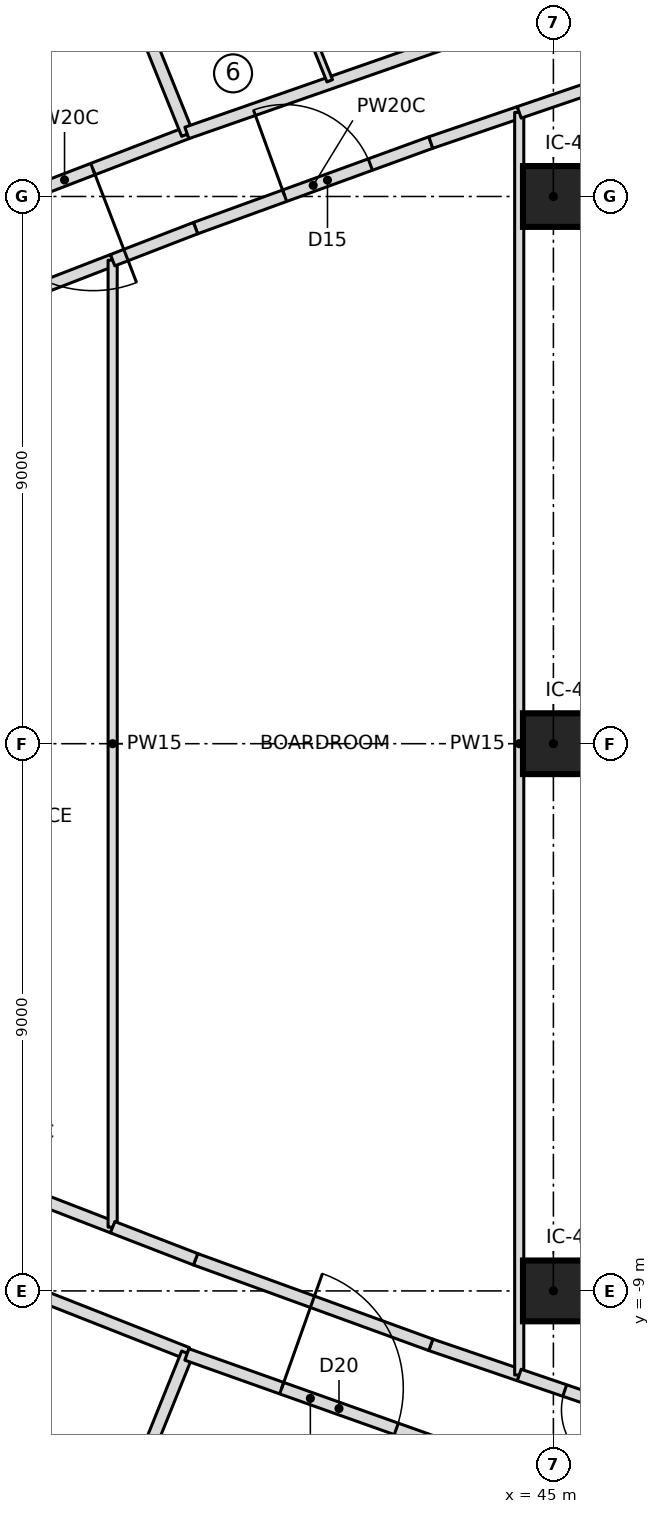
"""IFC4 building model, lengths in metres.
Left out: names, types, materials, properties, quantities, classifications, styles, units other than length and angle.
Written with IfcOpenShell. Run it as: python <this file> out.ifc"""

import sys

from ifc_helpers import new_model, si_unit, direction, frame, frame_2d, origin, origin_2d, place, context, subcontext, project, spatial, rectangle, extrude, element, fill, save


model = new_model("IFC4")
c1 = context("Model", 3, precision=1e-05, world=origin(), true_north=direction((0.0, 1.0)))
c2 = subcontext(c1, "Body", "Model", "MODEL_VIEW")
j1 = project(units=[si_unit("LENGTHUNIT", "METRE"), si_unit("PLANEANGLEUNIT", "RADIAN")], contexts=[c1])
p1 = place(None, origin())
s1 = spatial("IfcSite", under=j1, at=p1, CompositionType="ELEMENT")
p2 = place(p1, origin())
s2 = spatial("IfcBuilding", under=s1, at=p2, CompositionType="ELEMENT")
p3 = place(p2, frame((0.0, 0.0, 200.35)))
s3 = spatial("IfcBuildingStorey", under=s2, at=p3, CompositionType="ELEMENT", Elevation=200.35)
for number, where, z_axis, x_axis in (
    (1, (45.0, -9.0, 0.0), (0.0, 0.0, 1.0), (1.0, 0.0, 0.0)),
    (2, (45.0, 0.0, 0.0), (0.0, 0.0, 1.0), (1.0, 0.0, 0.0)),
    (3, (45.0, 9.0, 0.0), (0.0, 0.0, 1.0), (1.0, 0.0, 0.0)),
):
    element("IfcColumn", number, at=place(p3, frame(where, z_axis=z_axis, x_axis=x_axis)), inside=s3, PredefinedType="COLUMN", context=c2, shape_type="SweptSolid", body=[
        extrude(rectangle(XDim=1.0, YDim=1.0, at=origin_2d()), origin(), (0.0, 0.0, 1.0), 3.55),
    ])
p4 = place(p3, frame((38.972, 10.045, 0.0), z_axis=(0.0, 0.0, 1.0), x_axis=(-0.93335728106, -0.358948723208, 0.0)))
e4 = element("IfcWall", 4, at=p4, inside=s3, PredefinedType="PARTITIONING", context=c2, shape_type="SweptSolid", body=[
    extrude(rectangle(XDim=4.312, YDim=0.2, at=frame_2d((2.156, 0.0))), origin(), (0.0, 0.0, 1.0), 3.25),
])
p5 = place(p4, frame((1.656, 0.0, 0.0)))
e5 = element("IfcOpeningElement", 5, at=p5, cuts=e4, PredefinedType="OPENING", context=c2, shape_type="SweptSolid", body=[
    extrude(rectangle(XDim=2.0, YDim=2.4, at=frame_2d((1.0, 1.2))), frame((0.0, 0.11, 0.0), z_axis=(0.0, -1.0, 0.0), x_axis=(1.0, 0.0, 0.0)), (0.0, 0.0, 1.0), 0.22),
])
p6 = place(p3, frame((38.98, 10.026, 0.0), z_axis=(0.0, 0.0, 1.0), x_axis=(-0.373863662938, 0.927483671843, 0.0)))
e6 = element("IfcWall", 6, at=p6, inside=s3, PredefinedType="PARTITIONING", context=c2, shape_type="SweptSolid", body=[
    extrude(rectangle(XDim=7.604, YDim=0.2, at=frame_2d((3.802, 0.0))), origin(), (0.0, 0.0, 1.0), 3.25),
])
p7 = place(p3, frame((47.113, 12.886, 0.0), z_axis=(0.0, 0.0, 1.0), x_axis=(-0.944155939639, -0.329498955453, 0.0)))
e7 = element("IfcWall", 7, at=p7, inside=s3, PredefinedType="PARTITIONING", context=c2, shape_type="SweptSolid", body=[
    extrude(rectangle(XDim=8.622, YDim=0.2, at=frame_2d((4.311, 0.0))), origin(), (0.0, 0.0, 1.0), 3.25),
])
p8 = place(p7, frame((0.35, 0.0, 0.0)))
e8 = element("IfcOpeningElement", 8, at=p8, cuts=e7, PredefinedType="OPENING", context=c2, shape_type="SweptSolid", body=[
    extrude(rectangle(XDim=1.5, YDim=2.1, at=frame_2d((0.75, 1.05))), frame((0.0, 0.11, 0.0), z_axis=(0.0, -1.0, 0.0), x_axis=(1.0, 0.0, 0.0)), (0.0, 0.0, 1.0), 0.22),
])
p9 = place(p3, frame((40.47, 13.016, 0.0), z_axis=(0.0, 0.0, 1.0), x_axis=(0.373846436826, -0.927490615409, 0.0)))
e9 = element("IfcWall", 9, at=p9, inside=s3, PredefinedType="PARTITIONING", context=c2, shape_type="SweptSolid", body=[
    extrude(rectangle(XDim=2.279, YDim=0.1, at=frame_2d((1.139, 0.0))), origin(), (0.0, 0.0, 1.0), 3.25),
])
p10 = place(p3, frame((30.958, -6.866, 0.0), z_axis=(0.0, 0.0, 1.0), x_axis=(0.93040517394, -0.366532689274, 0.0)))
e10 = element("IfcWall", 10, at=p10, inside=s3, PredefinedType="PARTITIONING", context=c2, shape_type="SweptSolid", body=[
    extrude(rectangle(XDim=8.622, YDim=0.2, at=frame_2d((4.311, 0.0))), origin(), (0.0, 0.0, 1.0), 3.25),
])
p11 = place(p10, frame((4.25, 0.0, 0.0)))
e11 = element("IfcOpeningElement", 11, at=p11, cuts=e10, PredefinedType="OPENING", context=c2, shape_type="SweptSolid", body=[
    extrude(rectangle(XDim=1.5, YDim=2.1, at=frame_2d((0.75, 1.05))), frame((0.0, 0.11, 0.0), z_axis=(0.0, -1.0, 0.0), x_axis=(1.0, 0.0, 0.0)), (0.0, 0.0, 1.0), 0.22),
])
p12 = place(p3, frame((36.137, -17.079, 0.0), z_axis=(0.0, 0.0, 1.0), x_axis=(0.373863662938, 0.927483671843, 0.0)))
e12 = element("IfcWall", 12, at=p12, inside=s3, PredefinedType="PARTITIONING", context=c2, shape_type="SweptSolid", body=[
    extrude(rectangle(XDim=7.604, YDim=0.2, at=frame_2d((3.802, 0.0))), origin(), (0.0, 0.0, 1.0), 3.25),
])
p13 = place(p3, frame((38.972, -10.045, 0.0), z_axis=(0.0, 0.0, 1.0), x_axis=(0.942220252757, -0.334994022773, 0.0)))
e13 = element("IfcWall", 13, at=p13, inside=s3, PredefinedType="PARTITIONING", context=c2, shape_type="SweptSolid", body=[
    extrude(rectangle(XDim=4.31, YDim=0.2, at=frame_2d((2.155, 0.0))), origin(), (0.0, 0.0, 1.0), 3.25),
])
p14 = place(p13, frame((1.655, 0.0, 0.0)))
e14 = element("IfcOpeningElement", 14, at=p14, cuts=e13, PredefinedType="OPENING", context=c2, shape_type="SweptSolid", body=[
    extrude(rectangle(XDim=2.0, YDim=2.4, at=frame_2d((1.0, 1.2))), frame((0.0, 0.11, 0.0), z_axis=(0.0, -1.0, 0.0), x_axis=(1.0, 0.0, 0.0)), (0.0, 0.0, 1.0), 0.22),
])
for number, where, z_axis, x_axis in (
    (15, (35.276, 6.994, 0.0), (0.0, 0.0, 1.0), (0.933, 0.361, 0.0)),
    (16, (37.752, -7.952, 0.0), (0.0, 0.0, 1.0), (-0.933, 0.361, 0.0)),
):
    element("IfcWall", number, at=place(p3, frame(where, z_axis=z_axis, x_axis=x_axis)), inside=s3, PredefinedType="PARTITIONING", context=c2, shape_type="SweptSolid", body=[
        extrude(rectangle(XDim=2.655, YDim=0.2, at=frame_2d((1.327, 0.0))), origin(), (0.0, 0.0, 1.0), 3.25),
    ])
p15 = place(p3, frame((37.752, -7.952, 0.0), z_axis=(0.0, 0.0, 1.0), x_axis=(0.0, 1.0, 0.0)))
e17 = element("IfcWall", 17, at=p15, inside=s3, PredefinedType="PARTITIONING", context=c2, shape_type="SweptSolid", body=[
    extrude(rectangle(XDim=15.904, YDim=0.15, at=frame_2d((7.952, 0.0))), origin(), (0.0, 0.0, 1.0), 3.25),
])
p16 = place(p3, frame((39.115, 8.479, 0.0), z_axis=(0.0, 0.0, 1.0), x_axis=(0.939727613335, 0.341923986779, 0.0)))
e18 = element("IfcWall", 18, at=p16, inside=s3, PredefinedType="PARTITIONING", context=c2, shape_type="SweptSolid", body=[
    extrude(rectangle(XDim=4.117, YDim=0.2, at=frame_2d((2.059, 0.0))), origin(), (0.0, 0.0, 1.0), 3.25),
])
p17 = place(p16, frame((1.559, 0.0, 0.0)))
e19 = element("IfcOpeningElement", 19, at=p17, cuts=e18, PredefinedType="OPENING", context=c2, shape_type="SweptSolid", body=[
    extrude(rectangle(XDim=1.5, YDim=2.1, at=frame_2d((0.75, 1.05))), frame((0.0, 0.11, 0.0), z_axis=(0.0, -1.0, 0.0), x_axis=(1.0, 0.0, 0.0)), (0.0, 0.0, 1.0), 0.22),
])
for number, where, z_axis, x_axis in (
    (20, (42.984, 9.887, 0.0), (0.0, 0.0, 1.0), (0.946, 0.323, 0.0)),
    (21, (44.438, -10.383, 0.0), (0.0, 0.0, 1.0), (-0.946, 0.323, 0.0)),
):
    element("IfcWall", number, at=place(p3, frame(where, z_axis=z_axis, x_axis=x_axis)), inside=s3, PredefinedType="PARTITIONING", context=c2, shape_type="SweptSolid", body=[
        extrude(rectangle(XDim=1.536, YDim=0.2, at=frame_2d((0.768, 0.0))), origin(), (0.0, 0.0, 1.0), 3.25),
    ])
p18 = place(p3, frame((42.984, -9.887, 0.0), z_axis=(0.0, 0.0, 1.0), x_axis=(-0.939727613335, 0.341923986779, 0.0)))
e22 = element("IfcWall", 22, at=p18, inside=s3, PredefinedType="PARTITIONING", context=c2, shape_type="SweptSolid", body=[
    extrude(rectangle(XDim=4.117, YDim=0.2, at=frame_2d((2.059, 0.0))), origin(), (0.0, 0.0, 1.0), 3.25),
])
for number, where, z_axis, x_axis in (
    (23, (39.115, -8.479, 0.0), (0.0, 0.0, 1.0), (-0.933, 0.361, 0.0)),
    (24, (37.752, 7.952, 0.0), (0.0, 0.0, 1.0), (0.933, 0.361, 0.0)),
):
    element("IfcWall", number, at=place(p3, frame(where, z_axis=z_axis, x_axis=x_axis)), inside=s3, PredefinedType="PARTITIONING", context=c2, shape_type="SweptSolid", body=[
        extrude(rectangle(XDim=1.462, YDim=0.2, at=frame_2d((0.731, 0.0))), origin(), (0.0, 0.0, 1.0), 3.25),
    ])
p19 = place(p3, frame((44.438, -10.383, 0.0), z_axis=(0.0, 0.0, 1.0), x_axis=(0.0, 1.0, 0.0)))
e25 = element("IfcWall", 25, at=p19, inside=s3, PredefinedType="PARTITIONING", context=c2, shape_type="SweptSolid", body=[
    extrude(rectangle(XDim=20.766, YDim=0.15, at=frame_2d((10.383, 0.0))), origin(), (0.0, 0.0, 1.0), 3.25),
])
p20 = place(p3, frame((46.881, -11.217, 0.0), z_axis=(0.0, 0.0, 1.0), x_axis=(-0.946427432629, 0.322916575554, 0.0)))
e26 = element("IfcWall", 26, at=p20, inside=s3, PredefinedType="PARTITIONING", context=c2, shape_type="SweptSolid", body=[
    extrude(rectangle(XDim=2.581, YDim=0.2, at=frame_2d((1.291, 0.0))), origin(), (0.0, 0.0, 1.0), 3.25),
])
p21 = place(p20, frame((0.791, 0.0, 0.0)))
e27 = element("IfcOpeningElement", 27, at=p21, cuts=e26, PredefinedType="OPENING", context=c2, shape_type="SweptSolid", body=[
    extrude(rectangle(XDim=1.0, YDim=2.1, at=frame_2d((0.5, 1.05))), frame((0.0, 0.11, 0.0), z_axis=(0.0, -1.0, 0.0), x_axis=(1.0, 0.0, 0.0)), (0.0, 0.0, 1.0), 0.22),
])
p22 = place(p3, frame((44.438, 10.383, 0.0), z_axis=(0.0, 0.0, 1.0), x_axis=(0.946427432629, 0.322916575554, 0.0)))
e28 = element("IfcWall", 28, at=p22, inside=s3, PredefinedType="PARTITIONING", context=c2, shape_type="SweptSolid", body=[
    extrude(rectangle(XDim=2.581, YDim=0.2, at=frame_2d((1.291, 0.0))), origin(), (0.0, 0.0, 1.0), 3.25),
])
p23 = place(p5, origin())
e29 = element("IfcDoor", 29, at=p23, inside=s3, OperationType="DOUBLE_DOOR_SINGLE_SWING", PredefinedType="DOOR", context=c2, shape_type="SweptSolid", body=[
    extrude(rectangle(XDim=2.0, YDim=2.4, at=frame_2d((1.0, 1.2))), frame((0.0, 0.025, 0.0), z_axis=(0.0, -1.0, 0.0), x_axis=(1.0, 0.0, 0.0)), (0.0, 0.0, 1.0), 0.05),
])
fill(e5, e29)
p24 = place(p14, origin())
e30 = element("IfcDoor", 30, at=p24, inside=s3, OperationType="DOUBLE_DOOR_SINGLE_SWING", PredefinedType="DOOR", context=c2, shape_type="SweptSolid", body=[
    extrude(rectangle(XDim=2.0, YDim=2.4, at=frame_2d((1.0, 1.2))), frame((0.0, 0.025, 0.0), z_axis=(0.0, -1.0, 0.0), x_axis=(1.0, 0.0, 0.0)), (0.0, 0.0, 1.0), 0.05),
])
fill(e14, e30)
p25 = place(p17, origin())
e31 = element("IfcDoor", 31, at=p25, inside=s3, OperationType="DOUBLE_DOOR_SINGLE_SWING", PredefinedType="DOOR", context=c2, shape_type="SweptSolid", body=[
    extrude(rectangle(XDim=1.5, YDim=2.1, at=frame_2d((0.75, 1.05))), frame((0.0, 0.025, 0.0), z_axis=(0.0, -1.0, 0.0), x_axis=(1.0, 0.0, 0.0)), (0.0, 0.0, 1.0), 0.05),
])
fill(e19, e31)
p26 = place(p21, origin())
e32 = element("IfcDoor", 32, at=p26, inside=s3, OperationType="SINGLE_SWING_LEFT", PredefinedType="DOOR", context=c2, shape_type="SweptSolid", body=[
    extrude(rectangle(XDim=1.0, YDim=2.1, at=frame_2d((0.5, 1.05))), frame((0.0, 0.025, 0.0), z_axis=(0.0, -1.0, 0.0), x_axis=(1.0, 0.0, 0.0)), (0.0, 0.0, 1.0), 0.05),
])
fill(e27, e32)
save(model, sys.argv[1])
